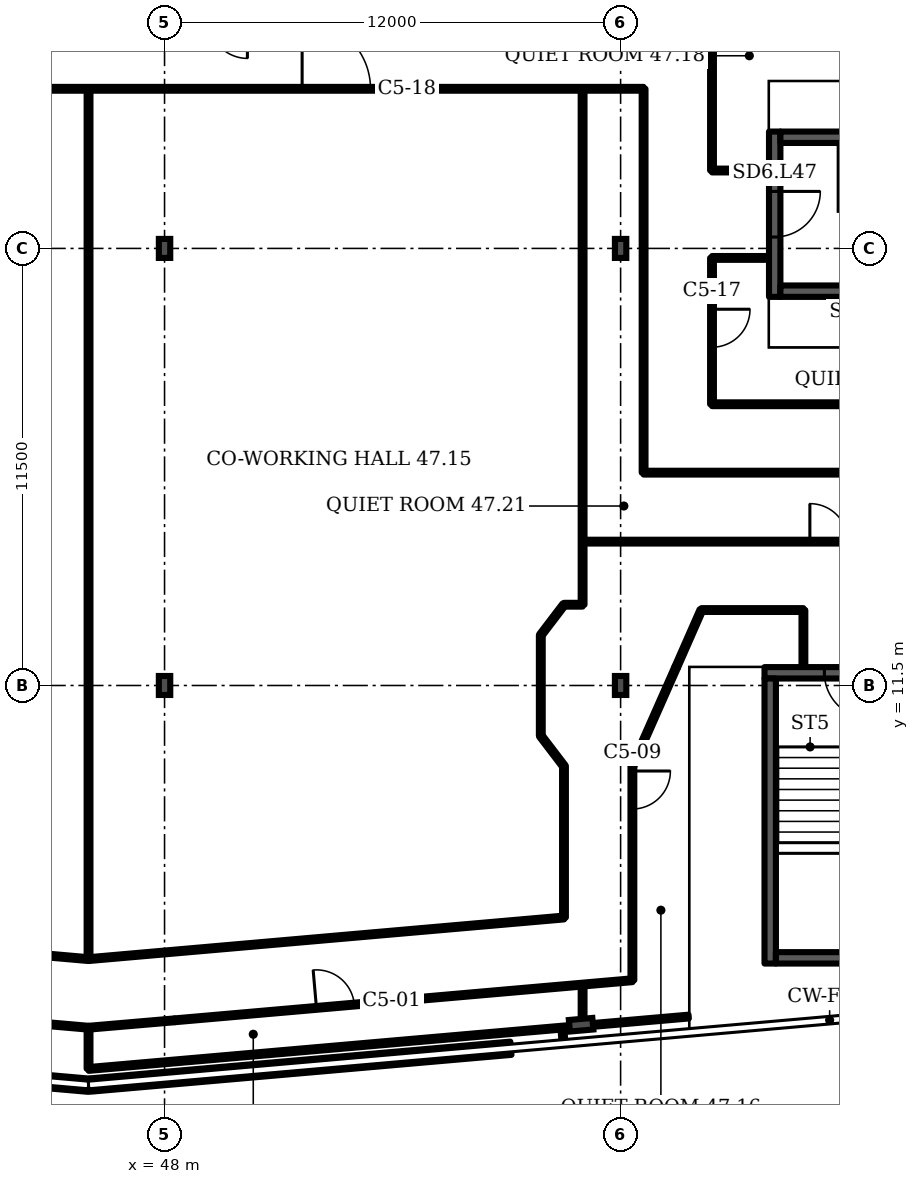
"""IFC4 building model, lengths in metres.
Left out: names, types, materials, properties, quantities, classifications, styles, units other than length and angle.
Written with IfcOpenShell. Run it as: python <this file> out.ifc"""

import sys

from ifc_helpers import new_model, si_unit, direction, frame, frame_2d, origin, origin_2d, place, context, subcontext, project, spatial, rectangle, i_section, extrude, element, fill, save


model = new_model("IFC4")
c1 = context("Model", 3, precision=1e-05, world=origin(), true_north=direction((0.0, 1.0)))
c2 = subcontext(c1, "Body", "Model", "MODEL_VIEW")
j1 = project(units=[si_unit("LENGTHUNIT", "METRE"), si_unit("PLANEANGLEUNIT", "RADIAN")], contexts=[c1])
p1 = place(None, origin())
s1 = spatial("IfcSite", under=j1, at=p1, CompositionType="ELEMENT")
p2 = place(p1, origin())
s2 = spatial("IfcBuilding", under=s1, at=p2, CompositionType="ELEMENT")
p3 = place(p2, frame((0.0, 0.0, 191.5)))
s3 = spatial("IfcBuildingStorey", under=s2, at=p3, CompositionType="ELEMENT", Elevation=191.5)
p4 = place(p3, frame((58.961, 2.573, 0.0), z_axis=(0.0, 0.0, 1.0), x_axis=(0.087156, -0.996198, 0.0)))
e1 = element("IfcColumn", 1, at=p4, inside=s3, PredefinedType="COLUMN", context=c2, shape_type="SweptSolid", body=[
    extrude(i_section(OverallWidth=0.305, OverallDepth=0.62, WebThickness=0.021, FlangeThickness=0.04, FilletRadius=0.027, at=origin_2d()), origin(), (0.0, 0.0, 1.0), 3.6),
])
for number, where, z_axis, x_axis in (
    (2, (48.0, 11.5, 0.0), (0.0, 0.0, 1.0), (1.0, 0.0, 0.0)),
    (3, (60.0, 11.5, 0.0), (0.0, 0.0, 1.0), (1.0, 0.0, 0.0)),
    (4, (48.0, 23.0, 0.0), (0.0, 0.0, 1.0), (1.0, 0.0, 0.0)),
    (5, (60.0, 23.0, 0.0), (0.0, 0.0, 1.0), (1.0, 0.0, 0.0)),
):
    element("IfcColumn", number, at=place(p3, frame(where, z_axis=z_axis, x_axis=x_axis)), inside=s3, PredefinedType="COLUMN", context=c2, shape_type="SweptSolid", body=[
        extrude(i_section(OverallWidth=0.3, OverallDepth=0.5, WebThickness=0.014, FlangeThickness=0.028, FilletRadius=0.027, at=origin_2d()), origin(), (0.0, 0.0, 1.0), 3.6),
    ])
p5 = place(p3, frame((35.03, 1.943, 0.0), z_axis=(0.0, 0.0, 1.0), x_axis=(0.996199, -0.08714, 0.0)))
e6 = element("IfcWall", 6, at=p5, inside=s3, PredefinedType="SOLIDWALL", context=c2, shape_type="SweptSolid", body=[
    extrude(rectangle(XDim=11.028, YDim=0.35, at=frame_2d((5.514, 0.0))), origin(), (0.0, 0.0, 1.0), 1.0),
])
p6 = place(p3, frame((46.045, 0.987, 0.0), z_axis=(0.0, 0.0, 1.0), x_axis=(0.996193, 0.087171, 0.0)))
e7 = element("IfcWall", 7, at=p6, inside=s3, PredefinedType="SOLIDWALL", context=c2, shape_type="SweptSolid", body=[
    extrude(rectangle(XDim=11.11, YDim=0.35, at=frame_2d((5.555, 0.0))), origin(), (0.0, 0.0, 1.0), 1.0),
])
p7 = place(p3, frame((63.786, 11.834, 0.0), z_axis=(0.0, 0.0, 1.0), x_axis=(1.0, 0.0, 0.0)))
e8 = element("IfcWall", 8, at=p7, inside=s3, PredefinedType="SHEAR", context=c2, shape_type="SweptSolid", body=[
    extrude(rectangle(XDim=4.35, YDim=0.3, at=frame_2d((2.175, 0.0))), origin(), (0.0, 0.0, 1.0), 3.2),
])
p8 = place(p7, frame((1.575, 0.0, 0.0)))
e9 = element("IfcOpeningElement", 9, at=p8, cuts=e8, PredefinedType="OPENING", context=c2, shape_type="SweptSolid", body=[
    extrude(rectangle(XDim=1.2, YDim=2.1, at=frame_2d((0.6, 1.05))), frame((0.0, 0.16, 0.0), z_axis=(0.0, -1.0, 0.0), x_axis=(1.0, 0.0, 0.0)), (0.0, 0.0, 1.0), 0.32),
])
p9 = place(p3, frame((64.055, 21.725, 0.0), z_axis=(0.0, 0.0, 1.0), x_axis=(0.0, 1.0, 0.0)))
e10 = element("IfcWall", 10, at=p9, inside=s3, PredefinedType="SHEAR", context=c2, shape_type="SweptSolid", body=[
    extrude(rectangle(XDim=4.35, YDim=0.3, at=frame_2d((2.175, 0.0))), origin(), (0.0, 0.0, 1.0), 3.2),
])
p10 = place(p9, frame((1.575, 0.0, 0.0)))
e11 = element("IfcOpeningElement", 11, at=p10, cuts=e10, PredefinedType="OPENING", context=c2, shape_type="SweptSolid", body=[
    extrude(rectangle(XDim=1.2, YDim=2.1, at=frame_2d((0.6, 1.05))), frame((0.0, 0.16, 0.0), z_axis=(0.0, -1.0, 0.0), x_axis=(1.0, 0.0, 0.0)), (0.0, 0.0, 1.0), 0.32),
])
p11 = place(p3, frame((19.3, 27.2, 0.0), z_axis=(0.0, 0.0, 1.0), x_axis=(1.0, 0.0, 0.0)))
e12 = element("IfcWall", 12, at=p11, inside=s3, PredefinedType="PARTITIONING", context=c2, shape_type="SweptSolid", body=[
    extrude(rectangle(XDim=41.305, YDim=0.1, at=frame_2d((20.652, 0.0))), origin(), (0.0, 0.0, 1.0), 3.2),
])
p12 = place(p11, frame((32.32, 0.0, 0.0)))
e13 = element("IfcOpeningElement", 13, at=p12, cuts=e12, PredefinedType="OPENING", context=c2, shape_type="SweptSolid", body=[
    extrude(rectangle(XDim=1.8, YDim=2.1, at=frame_2d((0.9, 1.05))), frame((0.0, 0.06, 0.0), z_axis=(0.0, -1.0, 0.0), x_axis=(1.0, 0.0, 0.0)), (0.0, 0.0, 1.0), 0.12),
])
p13 = place(p3, frame((46.0, 4.3, 0.0), z_axis=(0.0, 0.0, 1.0), x_axis=(-0.996173, 0.087448, 0.0)))
e14 = element("IfcWall", 14, at=p13, inside=s3, PredefinedType="PARTITIONING", context=c2, shape_type="SweptSolid", body=[
    extrude(rectangle(XDim=7.315, YDim=0.1, at=frame_2d((3.657, 0.0))), origin(), (0.0, 0.0, 1.0), 3.2),
])
p14 = place(p3, frame((46.0, 1.41, 0.0), z_axis=(0.0, 0.0, 1.0), x_axis=(0.996213, 0.086958, 0.0)))
e15 = element("IfcWall", 15, at=p14, inside=s3, PredefinedType="PARTITIONING", context=c2, shape_type="SweptSolid", body=[
    extrude(rectangle(XDim=15.852, YDim=0.1, at=frame_2d((7.926, 0.0))), origin(), (0.0, 0.0, 1.0), 2.58),
])
p15 = place(p3, frame((46.0, 1.415, 0.0), z_axis=(0.0, 0.0, 1.0), x_axis=(0.0, 1.0, 0.0)))
e16 = element("IfcWall", 16, at=p15, inside=s3, PredefinedType="PARTITIONING", context=c2, shape_type="SweptSolid", body=[
    extrude(rectangle(XDim=1.08, YDim=0.1, at=frame_2d((0.54, 0.0))), origin(), (0.0, 0.0, 1.0), 3.2),
])
p16 = place(p3, frame((46.0, 2.495, 0.0), z_axis=(0.0, 0.0, 1.0), x_axis=(-0.996214, 0.08693, 0.0)))
e17 = element("IfcWall", 17, at=p16, inside=s3, PredefinedType="PARTITIONING", context=c2, shape_type="SweptSolid", body=[
    extrude(rectangle(XDim=11.503, YDim=0.1, at=frame_2d((5.752, 0.0))), origin(), (0.0, 0.0, 1.0), 3.2),
])
p17 = place(p16, frame((8.642, 0.0, 0.0)))
e18 = element("IfcOpeningElement", 18, at=p17, cuts=e17, PredefinedType="OPENING", context=c2, shape_type="SweptSolid", body=[
    extrude(rectangle(XDim=1.0, YDim=2.1, at=frame_2d((0.5, 1.05))), frame((0.0, 0.06, 0.0), z_axis=(0.0, -1.0, 0.0), x_axis=(1.0, 0.0, 0.0)), (0.0, 0.0, 1.0), 0.12),
])
p18 = place(p3, frame((46.0, 4.3, 0.0), z_axis=(0.0, 0.0, 1.0), x_axis=(0.0, 1.0, 0.0)))
e19 = element("IfcWall", 19, at=p18, inside=s3, PredefinedType="PARTITIONING", context=c2, shape_type="SweptSolid", body=[
    extrude(rectangle(XDim=22.9, YDim=0.1, at=frame_2d((11.45, 0.0))), origin(), (0.0, 0.0, 1.0), 3.2),
])
p19 = place(p3, frame((46.0, 2.495, 0.0), z_axis=(0.0, 0.0, 1.0), x_axis=(0.996324, 0.085703, 0.0)))
e20 = element("IfcWall", 20, at=p19, inside=s3, PredefinedType="PARTITIONING", context=c2, shape_type="SweptSolid", body=[
    extrude(rectangle(XDim=2.273, YDim=0.1, at=frame_2d((1.137, 0.0))), origin(), (0.0, 0.0, 1.0), 3.2),
])
p20 = place(p3, frame((46.0, 4.3, 0.0), z_axis=(0.0, 0.0, 1.0), x_axis=(0.996189, 0.087194, 0.0)))
e21 = element("IfcWall", 21, at=p20, inside=s3, PredefinedType="PARTITIONING", context=c2, shape_type="SweptSolid", body=[
    extrude(rectangle(XDim=12.558, YDim=0.1, at=frame_2d((6.279, 0.0))), origin(), (0.0, 0.0, 1.0), 3.2),
])
p21 = place(p3, frame((48.265, 2.69, 0.0), z_axis=(0.0, 0.0, 1.0), x_axis=(0.996187, 0.087229, 0.0)))
e22 = element("IfcWall", 22, at=p21, inside=s3, PredefinedType="PARTITIONING", context=c2, shape_type="SweptSolid", body=[
    extrude(rectangle(XDim=12.091, YDim=0.1, at=frame_2d((6.045, 0.0))), origin(), (0.0, 0.0, 1.0), 3.2),
])
p22 = place(p21, frame((3.747, 0.0, 0.0)))
e23 = element("IfcOpeningElement", 23, at=p22, cuts=e22, PredefinedType="OPENING", context=c2, shape_type="SweptSolid", body=[
    extrude(rectangle(XDim=1.0, YDim=2.1, at=frame_2d((0.5, 1.05))), frame((0.0, 0.06, 0.0), z_axis=(0.0, -1.0, 0.0), x_axis=(1.0, 0.0, 0.0)), (0.0, 0.0, 1.0), 0.12),
])
p23 = place(p3, frame((57.9, 10.175, 0.0), z_axis=(0.0, 0.0, 1.0), x_axis=(0.0, 1.0, 0.0)))
e24 = element("IfcWall", 24, at=p23, inside=s3, PredefinedType="PARTITIONING", context=c2, shape_type="SweptSolid", body=[
    extrude(rectangle(XDim=2.65, YDim=0.1, at=frame_2d((1.325, 0.0))), origin(), (0.0, 0.0, 1.0), 3.2),
])
p24 = place(p3, frame((57.9, 12.825, 0.0), z_axis=(0.0, 0.0, 1.0), x_axis=(0.60639, 0.795174, 0.0)))
e25 = element("IfcWall", 25, at=p24, inside=s3, PredefinedType="PARTITIONING", context=c2, shape_type="SweptSolid", body=[
    extrude(rectangle(XDim=1.006, YDim=0.1, at=frame_2d((0.503, 0.0))), origin(), (0.0, 0.0, 1.0), 3.2),
])
p25 = place(p3, frame((58.498, 2.102, 0.0), z_axis=(0.0, 0.0, 1.0), x_axis=(-0.083045, 0.996542, 0.0)))
e26 = element("IfcWall", 26, at=p25, inside=s3, PredefinedType="PARTITIONING", context=c2, shape_type="SweptSolid", body=[
    extrude(rectangle(XDim=0.4, YDim=0.1, at=frame_2d((0.2, 0.0))), origin(), (0.0, 0.0, 1.0), 3.2),
])
p26 = place(p3, frame((58.51, 9.375, 0.0), z_axis=(0.0, 0.0, 1.0), x_axis=(-0.60639, 0.795174, 0.0)))
e27 = element("IfcWall", 27, at=p26, inside=s3, PredefinedType="PARTITIONING", context=c2, shape_type="SweptSolid", body=[
    extrude(rectangle(XDim=1.006, YDim=0.1, at=frame_2d((0.503, 0.0))), origin(), (0.0, 0.0, 1.0), 3.2),
])
p27 = place(p3, frame((58.51, 5.395, 0.0), z_axis=(0.0, 0.0, 1.0), x_axis=(0.0, 1.0, 0.0)))
e28 = element("IfcWall", 28, at=p27, inside=s3, PredefinedType="PARTITIONING", context=c2, shape_type="SweptSolid", body=[
    extrude(rectangle(XDim=3.98, YDim=0.1, at=frame_2d((1.99, 0.0))), origin(), (0.0, 0.0, 1.0), 3.2),
])
p28 = place(p3, frame((58.51, 13.625, 0.0), z_axis=(0.0, 0.0, 1.0), x_axis=(1.0, 0.0, 0.0)))
e29 = element("IfcWall", 29, at=p28, inside=s3, PredefinedType="PARTITIONING", context=c2, shape_type="SweptSolid", body=[
    extrude(rectangle(XDim=0.49, YDim=0.1, at=frame_2d((0.245, 0.0))), origin(), (0.0, 0.0, 1.0), 3.2),
])
p29 = place(p3, frame((59.0, 2.545, 0.0), z_axis=(0.0, 0.0, 1.0), x_axis=(0.0, 1.0, 0.0)))
e30 = element("IfcWall", 30, at=p29, inside=s3, PredefinedType="PARTITIONING", context=c2, shape_type="SweptSolid", body=[
    extrude(rectangle(XDim=1.085, YDim=0.1, at=frame_2d((0.542, 0.0))), origin(), (0.0, 0.0, 1.0), 3.2),
])
p30 = place(p3, frame((59.0, 13.625, 0.0), z_axis=(0.0, 0.0, 1.0), x_axis=(0.0, 1.0, 0.0)))
e31 = element("IfcWall", 31, at=p30, inside=s3, PredefinedType="PARTITIONING", context=c2, shape_type="SweptSolid", body=[
    extrude(rectangle(XDim=13.575, YDim=0.1, at=frame_2d((6.788, 0.0))), origin(), (0.0, 0.0, 1.0), 3.2),
])
p31 = place(p3, frame((59.0, 15.285, 0.0), z_axis=(0.0, 0.0, 1.0), x_axis=(1.0, 0.0, 0.0)))
e32 = element("IfcWall", 32, at=p31, inside=s3, PredefinedType="PARTITIONING", context=c2, shape_type="SweptSolid", body=[
    extrude(rectangle(XDim=13.0, YDim=0.1, at=frame_2d((6.5, 0.0))), origin(), (0.0, 0.0, 1.0), 3.2),
])
p32 = place(p31, frame((5.98, 0.0, 0.0)))
e33 = element("IfcOpeningElement", 33, at=p32, cuts=e32, PredefinedType="OPENING", context=c2, shape_type="SweptSolid", body=[
    extrude(rectangle(XDim=1.0, YDim=2.1, at=frame_2d((0.5, 1.05))), frame((0.0, 0.06, 0.0), z_axis=(0.0, -1.0, 0.0), x_axis=(1.0, 0.0, 0.0)), (0.0, 0.0, 1.0), 0.12),
])
p33 = place(p3, frame((60.31, 3.745, 0.0), z_axis=(0.0, 0.0, 1.0), x_axis=(0.0, 1.0, 0.0)))
e34 = element("IfcWall", 34, at=p33, inside=s3, PredefinedType="PARTITIONING", context=c2, shape_type="SweptSolid", body=[
    extrude(rectangle(XDim=5.63, YDim=0.1, at=frame_2d((2.815, 0.0))), origin(), (0.0, 0.0, 1.0), 3.2),
])
p34 = place(p33, frame((4.505, 0.0, 0.0)))
e35 = element("IfcOpeningElement", 35, at=p34, cuts=e34, PredefinedType="OPENING", context=c2, shape_type="SweptSolid", body=[
    extrude(rectangle(XDim=1.0, YDim=2.1, at=frame_2d((0.5, 1.05))), frame((0.0, 0.06, 0.0), z_axis=(0.0, -1.0, 0.0), x_axis=(1.0, 0.0, 0.0)), (0.0, 0.0, 1.0), 0.12),
])
p35 = place(p3, frame((60.31, 9.375, 0.0), z_axis=(0.0, 0.0, 1.0), x_axis=(0.404668, 0.914459, 0.0)))
e36 = element("IfcWall", 36, at=p35, inside=s3, PredefinedType="PARTITIONING", context=c2, shape_type="SweptSolid", body=[
    extrude(rectangle(XDim=2.854, YDim=0.1, at=frame_2d((1.427, 0.0))), origin(), (0.0, 0.0, 1.0), 3.2),
])
p36 = place(p3, frame((60.605, 17.1, 0.0), z_axis=(0.0, 0.0, 1.0), x_axis=(0.0, 1.0, 0.0)))
e37 = element("IfcWall", 37, at=p36, inside=s3, PredefinedType="PARTITIONING", context=c2, shape_type="SweptSolid", body=[
    extrude(rectangle(XDim=10.1, YDim=0.1, at=frame_2d((5.05, 0.0))), origin(), (0.0, 0.0, 1.0), 3.2),
])
p37 = place(p3, frame((60.605, 17.1, 0.0), z_axis=(0.0, 0.0, 1.0), x_axis=(1.0, 0.0, 0.0)))
e38 = element("IfcWall", 38, at=p37, inside=s3, PredefinedType="PARTITIONING", context=c2, shape_type="SweptSolid", body=[
    extrude(rectangle(XDim=15.58, YDim=0.1, at=frame_2d((7.79, 0.0))), origin(), (0.0, 0.0, 1.0), 3.2),
])
p38 = place(p3, frame((61.465, 11.985, 0.0), z_axis=(0.0, 0.0, 1.0), x_axis=(0.402692, 0.915331, 0.0)))
e39 = element("IfcWall", 39, at=p38, inside=s3, PredefinedType="PARTITIONING", context=c2, shape_type="SweptSolid", body=[
    extrude(rectangle(XDim=1.639, YDim=0.1, at=frame_2d((0.819, 0.0))), origin(), (0.0, 0.0, 1.0), 3.2),
])
p39 = place(p3, frame((62.125, 13.485, 0.0), z_axis=(0.0, 0.0, 1.0), x_axis=(1.0, 0.0, 0.0)))
e40 = element("IfcWall", 40, at=p39, inside=s3, PredefinedType="PARTITIONING", context=c2, shape_type="SweptSolid", body=[
    extrude(rectangle(XDim=2.685, YDim=0.1, at=frame_2d((1.343, 0.0))), origin(), (0.0, 0.0, 1.0), 3.2),
])
p40 = place(p3, frame((62.405, 18.9, 0.0), z_axis=(0.0, 0.0, 1.0), x_axis=(0.0, 1.0, 0.0)))
e41 = element("IfcWall", 41, at=p40, inside=s3, PredefinedType="PARTITIONING", context=c2, shape_type="SweptSolid", body=[
    extrude(rectangle(XDim=3.85, YDim=0.1, at=frame_2d((1.925, 0.0))), origin(), (0.0, 0.0, 1.0), 3.2),
])
p41 = place(p40, frame((1.5, 0.0, 0.0)))
e42 = element("IfcOpeningElement", 42, at=p41, cuts=e41, PredefinedType="OPENING", context=c2, shape_type="SweptSolid", body=[
    extrude(rectangle(XDim=1.0, YDim=2.1, at=frame_2d((0.5, 1.05))), frame((0.0, 0.06, 0.0), z_axis=(0.0, -1.0, 0.0), x_axis=(1.0, 0.0, 0.0)), (0.0, 0.0, 1.0), 0.12),
])
p42 = place(p3, frame((62.405, 18.9, 0.0), z_axis=(0.0, 0.0, 1.0), x_axis=(1.0, 0.0, 0.0)))
e43 = element("IfcWall", 43, at=p42, inside=s3, PredefinedType="PARTITIONING", context=c2, shape_type="SweptSolid", body=[
    extrude(rectangle(XDim=14.985, YDim=0.1, at=frame_2d((7.492, 0.0))), origin(), (0.0, 0.0, 1.0), 3.2),
])
p43 = place(p3, frame((62.405, 22.75, 0.0), z_axis=(0.0, 0.0, 1.0), x_axis=(1.0, 0.0, 0.0)))
e44 = element("IfcWall", 44, at=p43, inside=s3, PredefinedType="PARTITIONING", context=c2, shape_type="SweptSolid", body=[
    extrude(rectangle(XDim=1.479, YDim=0.1, at=frame_2d((0.74, 0.0))), origin(), (0.0, 0.0, 1.0), 3.2),
])
p44 = place(p3, frame((62.405, 25.05, 0.0), z_axis=(0.0, 0.0, 1.0), x_axis=(0.0, 1.0, 0.0)))
e45 = element("IfcWall", 45, at=p44, inside=s3, PredefinedType="PARTITIONING", context=c2, shape_type="SweptSolid", body=[
    extrude(rectangle(XDim=3.85, YDim=0.1, at=frame_2d((1.925, 0.0))), origin(), (0.0, 0.0, 1.0), 3.2),
])
p45 = place(p3, frame((62.405, 25.05, 0.0), z_axis=(0.0, 0.0, 1.0), x_axis=(1.0, 0.0, 0.0)))
e46 = element("IfcWall", 46, at=p45, inside=s3, PredefinedType="PARTITIONING", context=c2, shape_type="SweptSolid", body=[
    extrude(rectangle(XDim=1.479, YDim=0.1, at=frame_2d((0.74, 0.0))), origin(), (0.0, 0.0, 1.0), 3.2),
])
p46 = place(p3, frame((64.81, 12.004, 0.0), z_axis=(0.0, 0.0, 1.0), x_axis=(0.0, 1.0, 0.0)))
e47 = element("IfcWall", 47, at=p46, inside=s3, PredefinedType="PARTITIONING", context=c2, shape_type="SweptSolid", body=[
    extrude(rectangle(XDim=1.481, YDim=0.1, at=frame_2d((0.741, 0.0))), origin(), (0.0, 0.0, 1.0), 3.2),
])
p47 = place(p3, frame((63.936, 4.184, 0.0), z_axis=(0.0, 0.0, 1.0), x_axis=(0.0, 1.0, 0.0)))
e48 = element("IfcWall", 48, at=p47, inside=s3, PredefinedType="SHEAR", context=c2, shape_type="SweptSolid", body=[
    extrude(rectangle(XDim=7.5, YDim=0.3, at=frame_2d((3.75, 0.0))), origin(), (0.0, 0.0, 1.0), 3.2),
])
p48 = place(p3, frame((64.086, 4.334, 0.0), z_axis=(0.0, 0.0, 1.0), x_axis=(1.0, 0.0, 0.0)))
e49 = element("IfcWall", 49, at=p48, inside=s3, PredefinedType="SHEAR", context=c2, shape_type="SweptSolid", body=[
    extrude(rectangle(XDim=3.75, YDim=0.3, at=frame_2d((1.875, 0.0))), origin(), (0.0, 0.0, 1.0), 3.2),
])
for number, where, z_axis, x_axis in (
    (50, (64.205, 21.875, 0.0), (0.0, 0.0, 1.0), (1.0, 0.0, 0.0)),
    (51, (64.205, 25.925, 0.0), (0.0, 0.0, 1.0), (1.0, 0.0, 0.0)),
):
    element("IfcWall", number, at=place(p3, frame(where, z_axis=z_axis, x_axis=x_axis)), inside=s3, PredefinedType="SHEAR", context=c2, shape_type="SweptSolid", body=[
        extrude(rectangle(XDim=7.5, YDim=0.3, at=frame_2d((3.75, 0.0))), origin(), (0.0, 0.0, 1.0), 3.2),
    ])
p49 = place(p8, origin())
e52 = element("IfcDoor", 52, at=p49, inside=s3, OperationType="SINGLE_SWING_RIGHT", PredefinedType="DOOR", context=c2, shape_type="SweptSolid", body=[
    extrude(rectangle(XDim=1.2, YDim=2.1, at=frame_2d((0.6, 1.05))), frame((0.0, 0.025, 0.0), z_axis=(0.0, -1.0, 0.0), x_axis=(1.0, 0.0, 0.0)), (0.0, 0.0, 1.0), 0.05),
])
fill(e9, e52)
p50 = place(p10, origin())
e53 = element("IfcDoor", 53, at=p50, inside=s3, OperationType="SINGLE_SWING_RIGHT", PredefinedType="DOOR", context=c2, shape_type="SweptSolid", body=[
    extrude(rectangle(XDim=1.2, YDim=2.1, at=frame_2d((0.6, 1.05))), frame((0.0, 0.025, 0.0), z_axis=(0.0, -1.0, 0.0), x_axis=(1.0, 0.0, 0.0)), (0.0, 0.0, 1.0), 0.05),
])
fill(e11, e53)
p51 = place(p22, origin())
e54 = element("IfcDoor", 54, at=p51, inside=s3, OperationType="SINGLE_SWING_LEFT", PredefinedType="DOOR", context=c2, shape_type="SweptSolid", body=[
    extrude(rectangle(XDim=1.0, YDim=2.1, at=frame_2d((0.5, 1.05))), frame((0.0, 0.025, 0.0), z_axis=(0.0, -1.0, 0.0), x_axis=(1.0, 0.0, 0.0)), (0.0, 0.0, 1.0), 0.05),
])
fill(e23, e54)
p52 = place(p34, origin())
e55 = element("IfcDoor", 55, at=p52, inside=s3, OperationType="SINGLE_SWING_RIGHT", PredefinedType="DOOR", context=c2, shape_type="SweptSolid", body=[
    extrude(rectangle(XDim=1.0, YDim=2.1, at=frame_2d((0.5, 1.05))), frame((0.0, 0.025, 0.0), z_axis=(0.0, -1.0, 0.0), x_axis=(1.0, 0.0, 0.0)), (0.0, 0.0, 1.0), 0.05),
])
fill(e35, e55)
p53 = place(p32, origin())
e56 = element("IfcDoor", 56, at=p53, inside=s3, OperationType="SINGLE_SWING_LEFT", PredefinedType="DOOR", context=c2, shape_type="SweptSolid", body=[
    extrude(rectangle(XDim=1.0, YDim=2.1, at=frame_2d((0.5, 1.05))), frame((0.0, 0.025, 0.0), z_axis=(0.0, -1.0, 0.0), x_axis=(1.0, 0.0, 0.0)), (0.0, 0.0, 1.0), 0.05),
])
fill(e33, e56)
p54 = place(p41, origin())
e57 = element("IfcDoor", 57, at=p54, inside=s3, OperationType="SINGLE_SWING_RIGHT", PredefinedType="DOOR", context=c2, shape_type="SweptSolid", body=[
    extrude(rectangle(XDim=1.0, YDim=2.1, at=frame_2d((0.5, 1.05))), frame((0.0, 0.025, 0.0), z_axis=(0.0, -1.0, 0.0), x_axis=(1.0, 0.0, 0.0)), (0.0, 0.0, 1.0), 0.05),
])
fill(e42, e57)
p55 = place(p12, origin())
e58 = element("IfcDoor", 58, at=p55, inside=s3, OperationType="DOUBLE_DOOR_SINGLE_SWING", PredefinedType="DOOR", context=c2, shape_type="SweptSolid", body=[
    extrude(rectangle(XDim=1.8, YDim=2.1, at=frame_2d((0.9, 1.05))), frame((0.0, 0.025, 0.0), z_axis=(0.0, -1.0, 0.0), x_axis=(1.0, 0.0, 0.0)), (0.0, 0.0, 1.0), 0.05),
])
fill(e13, e58)
save(model, sys.argv[1])
